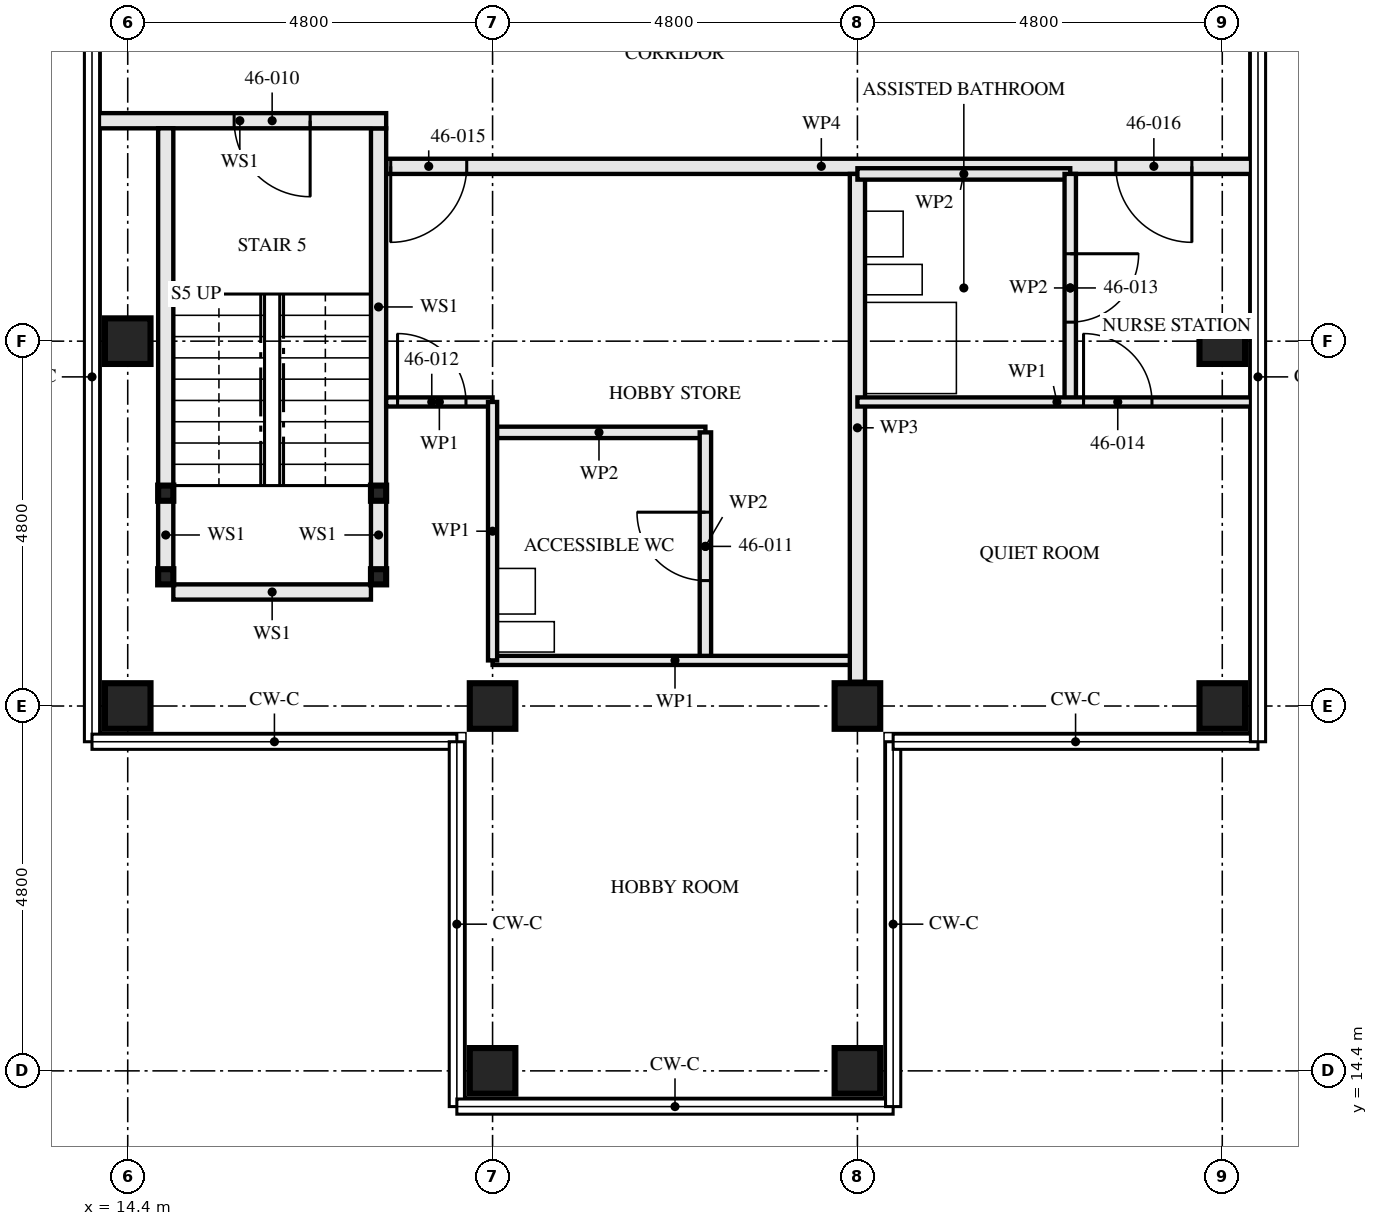
"""IFC4 building model, lengths in metres.
Left out: names, types, materials, properties, quantities, classifications, styles, units other than length and angle.
Written with IfcOpenShell. Run it as: python <this file> out.ifc"""

import sys

from ifc_helpers import new_model, si_unit, direction, frame, frame_2d, origin, origin_2d, place, context, subcontext, project, spatial, rectangle, hollow_rectangle, extrude, element, fill, save


model = new_model("IFC4")
c1 = context("Model", 3, precision=1e-05, world=origin(), true_north=direction((0.0, 1.0)))
c2 = subcontext(c1, "Body", "Model", "MODEL_VIEW")
j1 = project(units=[si_unit("LENGTHUNIT", "METRE"), si_unit("PLANEANGLEUNIT", "RADIAN")], contexts=[c1])
p1 = place(None, origin())
s1 = spatial("IfcSite", under=j1, at=p1, CompositionType="ELEMENT")
p2 = place(p1, origin())
s2 = spatial("IfcBuilding", under=s1, at=p2, CompositionType="ELEMENT")
p3 = place(p2, frame((0.0, 0.0, 169.0)))
s3 = spatial("IfcBuildingStorey", under=s2, at=p3, CompositionType="ELEMENT", Elevation=169.0)
p4 = place(p3, frame((14.4, 19.2, 0.0), z_axis=(0.0, 0.0, 1.0), x_axis=(0.0, 1.0, 0.0)))
e1 = element("IfcColumn", 1, at=p4, inside=s3, PredefinedType="COLUMN", context=c2, shape_type="SweptSolid", body=[
    extrude(hollow_rectangle(XDim=0.6, YDim=0.6, WallThickness=0.06, at=origin_2d()), origin(), (0.0, 0.0, 1.0), 3.5),
])
p5 = place(p3, frame((14.4, 24.0, 0.0), z_axis=(0.0, 0.0, 1.0), x_axis=(1.0, 0.0, 0.0)))
e2 = element("IfcColumn", 2, at=p5, inside=s3, PredefinedType="COLUMN", context=c2, shape_type="SweptSolid", body=[
    extrude(hollow_rectangle(XDim=0.6, YDim=0.6, WallThickness=0.08, at=origin_2d()), origin(), (0.0, 0.0, 1.0), 3.5),
])
for number, where, z_axis, x_axis in (
    (3, (19.2, 14.4, 0.0), (0.0, 0.0, 1.0), (0.0, 1.0, 0.0)),
    (4, (19.2, 19.2, 0.0), (0.0, 0.0, 1.0), (0.0, 1.0, 0.0)),
    (5, (24.0, 14.4, 0.0), (0.0, 0.0, 1.0), (0.0, 1.0, 0.0)),
    (6, (24.0, 19.2, 0.0), (0.0, 0.0, 1.0), (0.0, 1.0, 0.0)),
    (7, (28.8, 19.2, 0.0), (0.0, 0.0, 1.0), (0.0, 1.0, 0.0)),
):
    element("IfcColumn", number, at=place(p3, frame(where, z_axis=z_axis, x_axis=x_axis)), inside=s3, PredefinedType="COLUMN", context=c2, shape_type="SweptSolid", body=[
        extrude(hollow_rectangle(XDim=0.6, YDim=0.6, WallThickness=0.06, at=origin_2d()), origin(), (0.0, 0.0, 1.0), 3.5),
    ])
p6 = place(p3, frame((28.8, 24.0, 0.0), z_axis=(0.0, 0.0, 1.0), x_axis=(1.0, 0.0, 0.0)))
e8 = element("IfcColumn", 8, at=p6, inside=s3, PredefinedType="COLUMN", context=c2, shape_type="SweptSolid", body=[
    extrude(hollow_rectangle(XDim=0.6, YDim=0.6, WallThickness=0.08, at=origin_2d()), origin(), (0.0, 0.0, 1.0), 3.5),
])
for number, where, z_axis, x_axis in (
    (9, (14.9, 20.9, 0.0), (0.0, 0.0, 1.0), (1.0, 0.0, 0.0)),
    (10, (17.7, 20.9, 0.0), (0.0, 0.0, 1.0), (1.0, 0.0, 0.0)),
    (11, (14.9, 22.0, 0.0), (0.0, 0.0, 1.0), (1.0, 0.0, 0.0)),
    (12, (17.7, 22.0, 0.0), (0.0, 0.0, 1.0), (1.0, 0.0, 0.0)),
):
    element("IfcColumn", number, at=place(p3, frame(where, z_axis=z_axis, x_axis=x_axis)), inside=s3, PredefinedType="COLUMN", context=c2, shape_type="SweptSolid", body=[
        extrude(hollow_rectangle(XDim=0.2, YDim=0.2, WallThickness=0.008, at=origin_2d()), origin(), (0.0, 0.0, 1.0), 3.33),
    ])
p7 = place(p3, frame((14.9, 21.0, 0.0), z_axis=(0.0, 0.0, 1.0), x_axis=(0.0, 1.0, 0.0)))
e13 = element("IfcWall", 13, at=p7, inside=s3, PredefinedType="SOLIDWALL", context=c2, shape_type="SweptSolid", body=[
    extrude(rectangle(XDim=0.9, YDim=0.2, at=frame_2d((0.45, 0.0))), origin(), (0.0, 0.0, 1.0), 2.99),
])
p8 = place(p3, frame((14.9, 22.1, 0.0), z_axis=(0.0, 0.0, 1.0), x_axis=(0.0, 1.0, 0.0)))
e14 = element("IfcWall", 14, at=p8, inside=s3, PredefinedType="SOLIDWALL", context=c2, shape_type="SweptSolid", body=[
    extrude(rectangle(XDim=4.7, YDim=0.2, at=frame_2d((2.35, 0.0))), origin(), (0.0, 0.0, 1.0), 2.99),
])
p9 = place(p3, frame((17.7, 21.0, 0.0), z_axis=(0.0, 0.0, 1.0), x_axis=(0.0, 1.0, 0.0)))
e15 = element("IfcWall", 15, at=p9, inside=s3, PredefinedType="SOLIDWALL", context=c2, shape_type="SweptSolid", body=[
    extrude(rectangle(XDim=0.9, YDim=0.2, at=frame_2d((0.45, 0.0))), origin(), (0.0, 0.0, 1.0), 2.99),
])
p10 = place(p3, frame((17.7, 22.1, 0.0), z_axis=(0.0, 0.0, 1.0), x_axis=(0.0, 1.0, 0.0)))
e16 = element("IfcWall", 16, at=p10, inside=s3, PredefinedType="SOLIDWALL", context=c2, shape_type="SweptSolid", body=[
    extrude(rectangle(XDim=4.7, YDim=0.2, at=frame_2d((2.35, 0.0))), origin(), (0.0, 0.0, 1.0), 2.99),
])
p11 = place(p3, frame((15.0, 20.7, 0.0), z_axis=(0.0, 0.0, 1.0), x_axis=(1.0, 0.0, 0.0)))
e17 = element("IfcWall", 17, at=p11, inside=s3, PredefinedType="SOLIDWALL", context=c2, shape_type="SweptSolid", body=[
    extrude(rectangle(XDim=2.6, YDim=0.2, at=frame_2d((1.3, 0.0))), origin(), (0.0, 0.0, 1.0), 3.33),
])
p12 = place(p3, frame((13.95, 26.9, 0.0), z_axis=(0.0, 0.0, 1.0), x_axis=(1.0, 0.0, 0.0)))
e18 = element("IfcWall", 18, at=p12, inside=s3, PredefinedType="SOLIDWALL", context=c2, shape_type="SweptSolid", body=[
    extrude(rectangle(XDim=3.85, YDim=0.2, at=frame_2d((1.925, 0.0))), origin(), (0.0, 0.0, 1.0), 2.32),
])
p13 = place(p12, frame((1.85, 0.0, 0.0)))
e19 = element("IfcOpeningElement", 19, at=p13, cuts=e18, PredefinedType="OPENING", context=c2, shape_type="SweptSolid", body=[
    extrude(rectangle(XDim=1.0, YDim=2.1, at=frame_2d((0.5, 1.05))), frame((0.0, 0.111, 0.0), z_axis=(0.0, -1.0, 0.0), x_axis=(1.0, 0.0, 0.0)), (0.0, 0.0, 1.0), 0.221),
])
p14 = place(p3, frame((22.0, 19.8, 0.0), z_axis=(0.0, 0.0, 1.0), x_axis=(0.0, 1.0, 0.0)))
e20 = element("IfcWall", 20, at=p14, inside=s3, PredefinedType="PARTITIONING", context=c2, shape_type="SweptSolid", body=[
    extrude(rectangle(XDim=3.0, YDim=0.15, at=frame_2d((1.5, 0.0))), origin(), (0.0, 0.0, 1.0), 3.33),
])
p15 = place(p14, frame((1.05, 0.0, 0.0)))
e21 = element("IfcOpeningElement", 21, at=p15, cuts=e20, PredefinedType="OPENING", context=c2, shape_type="SweptSolid", body=[
    extrude(rectangle(XDim=0.9, YDim=2.1, at=frame_2d((0.45, 1.05))), frame((0.0, 0.085, 0.0), z_axis=(0.0, -1.0, 0.0), x_axis=(1.0, 0.0, 0.0)), (0.0, 0.0, 1.0), 0.171),
])
p16 = place(p3, frame((19.2, 22.8, 0.0), z_axis=(0.0, 0.0, 1.0), x_axis=(1.0, 0.0, 0.0)))
e22 = element("IfcWall", 22, at=p16, inside=s3, PredefinedType="PARTITIONING", context=c2, shape_type="SweptSolid", body=[
    extrude(rectangle(XDim=2.8, YDim=0.15, at=frame_2d((1.4, 0.0))), origin(), (0.0, 0.0, 1.0), 3.33),
])
p17 = place(p3, frame((17.8, 23.2, 0.0), z_axis=(0.0, 0.0, 1.0), x_axis=(1.0, 0.0, 0.0)))
e23 = element("IfcWall", 23, at=p17, inside=s3, PredefinedType="PARTITIONING", context=c2, shape_type="SweptSolid", body=[
    extrude(rectangle(XDim=1.4, YDim=0.12, at=frame_2d((0.7, 0.0))), origin(), (0.0, 0.0, 1.0), 3.33),
])
p18 = place(p17, frame((0.15, 0.0, 0.0)))
e24 = element("IfcOpeningElement", 24, at=p18, cuts=e23, PredefinedType="OPENING", context=c2, shape_type="SweptSolid", body=[
    extrude(rectangle(XDim=0.9, YDim=2.1, at=frame_2d((0.45, 1.05))), frame((0.0, 0.071, 0.0), z_axis=(0.0, -1.0, 0.0), x_axis=(1.0, 0.0, 0.0)), (0.0, 0.0, 1.0), 0.141),
])
p19 = place(p3, frame((19.2, 19.8, 0.0), z_axis=(0.0, 0.0, 1.0), x_axis=(1.0, 0.0, 0.0)))
e25 = element("IfcWall", 25, at=p19, inside=s3, PredefinedType="PARTITIONING", context=c2, shape_type="SweptSolid", body=[
    extrude(rectangle(XDim=4.8, YDim=0.12, at=frame_2d((2.4, 0.0))), origin(), (0.0, 0.0, 1.0), 3.33),
])
p20 = place(p3, frame((19.2, 19.8, 0.0), z_axis=(0.0, 0.0, 1.0), x_axis=(0.0, 1.0, 0.0)))
e26 = element("IfcWall", 26, at=p20, inside=s3, PredefinedType="PARTITIONING", context=c2, shape_type="SweptSolid", body=[
    extrude(rectangle(XDim=3.4, YDim=0.12, at=frame_2d((1.7, 0.0))), origin(), (0.0, 0.0, 1.0), 2.55),
])
p21 = place(p3, frame((24.0, 19.52, 0.0), z_axis=(0.0, 0.0, 1.0), x_axis=(0.0, 1.0, 0.0)))
e27 = element("IfcWall", 27, at=p21, inside=s3, PredefinedType="PARTITIONING", context=c2, shape_type="SweptSolid", body=[
    extrude(rectangle(XDim=6.68, YDim=0.2, at=frame_2d((3.34, 0.0))), origin(), (0.0, 0.0, 1.0), 2.55),
])
p22 = place(p3, frame((26.8, 23.2, 0.0), z_axis=(0.0, 0.0, 1.0), x_axis=(0.0, 1.0, 0.0)))
e28 = element("IfcWall", 28, at=p22, inside=s3, PredefinedType="PARTITIONING", context=c2, shape_type="SweptSolid", body=[
    extrude(rectangle(XDim=3.0, YDim=0.15, at=frame_2d((1.5, 0.0))), origin(), (0.0, 0.0, 1.0), 2.55),
])
p23 = place(p22, frame((1.05, 0.0, 0.0)))
e29 = element("IfcOpeningElement", 29, at=p23, cuts=e28, PredefinedType="OPENING", context=c2, shape_type="SweptSolid", body=[
    extrude(rectangle(XDim=0.9, YDim=2.1, at=frame_2d((0.45, 1.05))), frame((0.0, 0.085, 0.0), z_axis=(0.0, -1.0, 0.0), x_axis=(1.0, 0.0, 0.0)), (0.0, 0.0, 1.0), 0.171),
])
p24 = place(p3, frame((24.0, 26.2, 0.0), z_axis=(0.0, 0.0, 1.0), x_axis=(1.0, 0.0, 0.0)))
e30 = element("IfcWall", 30, at=p24, inside=s3, PredefinedType="PARTITIONING", context=c2, shape_type="SweptSolid", body=[
    extrude(rectangle(XDim=2.8, YDim=0.15, at=frame_2d((1.4, 0.0))), origin(), (0.0, 0.0, 1.0), 3.33),
])
p25 = place(p3, frame((24.0, 23.2, 0.0), z_axis=(0.0, 0.0, 1.0), x_axis=(1.0, 0.0, 0.0)))
e31 = element("IfcWall", 31, at=p25, inside=s3, PredefinedType="PARTITIONING", context=c2, shape_type="SweptSolid", body=[
    extrude(rectangle(XDim=5.25, YDim=0.12, at=frame_2d((2.625, 0.0))), origin(), (0.0, 0.0, 1.0), 2.32),
])
p26 = place(p25, frame((2.975, 0.0, 0.0)))
e32 = element("IfcOpeningElement", 32, at=p26, cuts=e31, PredefinedType="OPENING", context=c2, shape_type="SweptSolid", body=[
    extrude(rectangle(XDim=0.9, YDim=2.1, at=frame_2d((0.45, 1.05))), frame((0.0, 0.071, 0.0), z_axis=(0.0, -1.0, 0.0), x_axis=(1.0, 0.0, 0.0)), (0.0, 0.0, 1.0), 0.141),
])
p27 = place(p3, frame((17.8, 26.3, 0.0), z_axis=(0.0, 0.0, 1.0), x_axis=(1.0, 0.0, 0.0)))
e33 = element("IfcWall", 33, at=p27, inside=s3, PredefinedType="PARTITIONING", context=c2, shape_type="SweptSolid", body=[
    extrude(rectangle(XDim=11.45, YDim=0.2, at=frame_2d((5.725, 0.0))), origin(), (0.0, 0.0, 1.0), 2.32),
])
p28 = place(p27, frame((0.06, 0.0, 0.0)))
e34 = element("IfcOpeningElement", 34, at=p28, cuts=e33, PredefinedType="OPENING", context=c2, shape_type="SweptSolid", body=[
    extrude(rectangle(XDim=1.0, YDim=2.1, at=frame_2d((0.5, 1.05))), frame((0.0, 0.111, 0.0), z_axis=(0.0, -1.0, 0.0), x_axis=(1.0, 0.0, 0.0)), (0.0, 0.0, 1.0), 0.221),
])
p29 = place(p27, frame((9.6, 0.0, 0.0)))
e35 = element("IfcOpeningElement", 35, at=p29, cuts=e33, PredefinedType="OPENING", context=c2, shape_type="SweptSolid", body=[
    extrude(rectangle(XDim=1.0, YDim=2.1, at=frame_2d((0.5, 1.05))), frame((0.0, 0.111, 0.0), z_axis=(0.0, -1.0, 0.0), x_axis=(1.0, 0.0, 0.0)), (0.0, 0.0, 1.0), 0.221),
])
p30 = place(p13, frame((1.0, 0.0, 0.0), z_axis=(0.0, 0.0, 1.0), x_axis=(-1.0, 0.0, 0.0)))
e36 = element("IfcDoor", 36, at=p30, inside=s3, OperationType="SINGLE_SWING_RIGHT", PredefinedType="DOOR", context=c2, shape_type="SweptSolid", body=[
    extrude(rectangle(XDim=1.0, YDim=2.1, at=frame_2d((0.5, 1.05))), frame((0.0, 0.032, 0.0), z_axis=(0.0, -1.0, 0.0), x_axis=(1.0, 0.0, 0.0)), (0.0, 0.0, 1.0), 0.064),
])
fill(e19, e36)
p31 = place(p15, origin())
e37 = element("IfcDoor", 37, at=p31, inside=s3, OperationType="SINGLE_SWING_LEFT", PredefinedType="DOOR", context=c2, shape_type="SweptSolid", body=[
    extrude(rectangle(XDim=0.9, YDim=2.1, at=frame_2d((0.45, 1.05))), frame((0.0, 0.022, 0.0), z_axis=(0.0, -1.0, 0.0), x_axis=(1.0, 0.0, 0.0)), (0.0, 0.0, 1.0), 0.044),
])
fill(e21, e37)
p32 = place(p18, origin())
e38 = element("IfcDoor", 38, at=p32, inside=s3, OperationType="SINGLE_SWING_RIGHT", PredefinedType="DOOR", context=c2, shape_type="SweptSolid", body=[
    extrude(rectangle(XDim=0.9, YDim=2.1, at=frame_2d((0.45, 1.05))), frame((0.0, 0.022, 0.0), z_axis=(0.0, -1.0, 0.0), x_axis=(1.0, 0.0, 0.0)), (0.0, 0.0, 1.0), 0.044),
])
fill(e24, e38)
p33 = place(p23, frame((0.9, 0.0, 0.0), z_axis=(0.0, 0.0, 1.0), x_axis=(-1.0, 0.0, 0.0)))
e39 = element("IfcDoor", 39, at=p33, inside=s3, OperationType="SINGLE_SWING_RIGHT", PredefinedType="DOOR", context=c2, shape_type="SweptSolid", body=[
    extrude(rectangle(XDim=0.9, YDim=2.1, at=frame_2d((0.45, 1.05))), frame((0.0, 0.022, 0.0), z_axis=(0.0, -1.0, 0.0), x_axis=(1.0, 0.0, 0.0)), (0.0, 0.0, 1.0), 0.044),
])
fill(e29, e39)
p34 = place(p26, origin())
e40 = element("IfcDoor", 40, at=p34, inside=s3, OperationType="SINGLE_SWING_RIGHT", PredefinedType="DOOR", context=c2, shape_type="SweptSolid", body=[
    extrude(rectangle(XDim=0.9, YDim=2.1, at=frame_2d((0.45, 1.05))), frame((0.0, 0.022, 0.0), z_axis=(0.0, -1.0, 0.0), x_axis=(1.0, 0.0, 0.0)), (0.0, 0.0, 1.0), 0.044),
])
fill(e32, e40)
p35 = place(p28, frame((1.0, 0.0, 0.0), z_axis=(0.0, 0.0, 1.0), x_axis=(-1.0, 0.0, 0.0)))
e41 = element("IfcDoor", 41, at=p35, inside=s3, OperationType="SINGLE_SWING_LEFT", PredefinedType="DOOR", context=c2, shape_type="SweptSolid", body=[
    extrude(rectangle(XDim=1.0, YDim=2.1, at=frame_2d((0.5, 1.05))), frame((0.0, 0.027, 0.0), z_axis=(0.0, -1.0, 0.0), x_axis=(1.0, 0.0, 0.0)), (0.0, 0.0, 1.0), 0.054),
])
fill(e34, e41)
p36 = place(p29, frame((1.0, 0.0, 0.0), z_axis=(0.0, 0.0, 1.0), x_axis=(-1.0, 0.0, 0.0)))
e42 = element("IfcDoor", 42, at=p36, inside=s3, OperationType="SINGLE_SWING_RIGHT", PredefinedType="DOOR", context=c2, shape_type="SweptSolid", body=[
    extrude(rectangle(XDim=1.0, YDim=2.1, at=frame_2d((0.5, 1.05))), frame((0.0, 0.027, 0.0), z_axis=(0.0, -1.0, 0.0), x_axis=(1.0, 0.0, 0.0)), (0.0, 0.0, 1.0), 0.054),
])
fill(e35, e42)
save(model, sys.argv[1])
